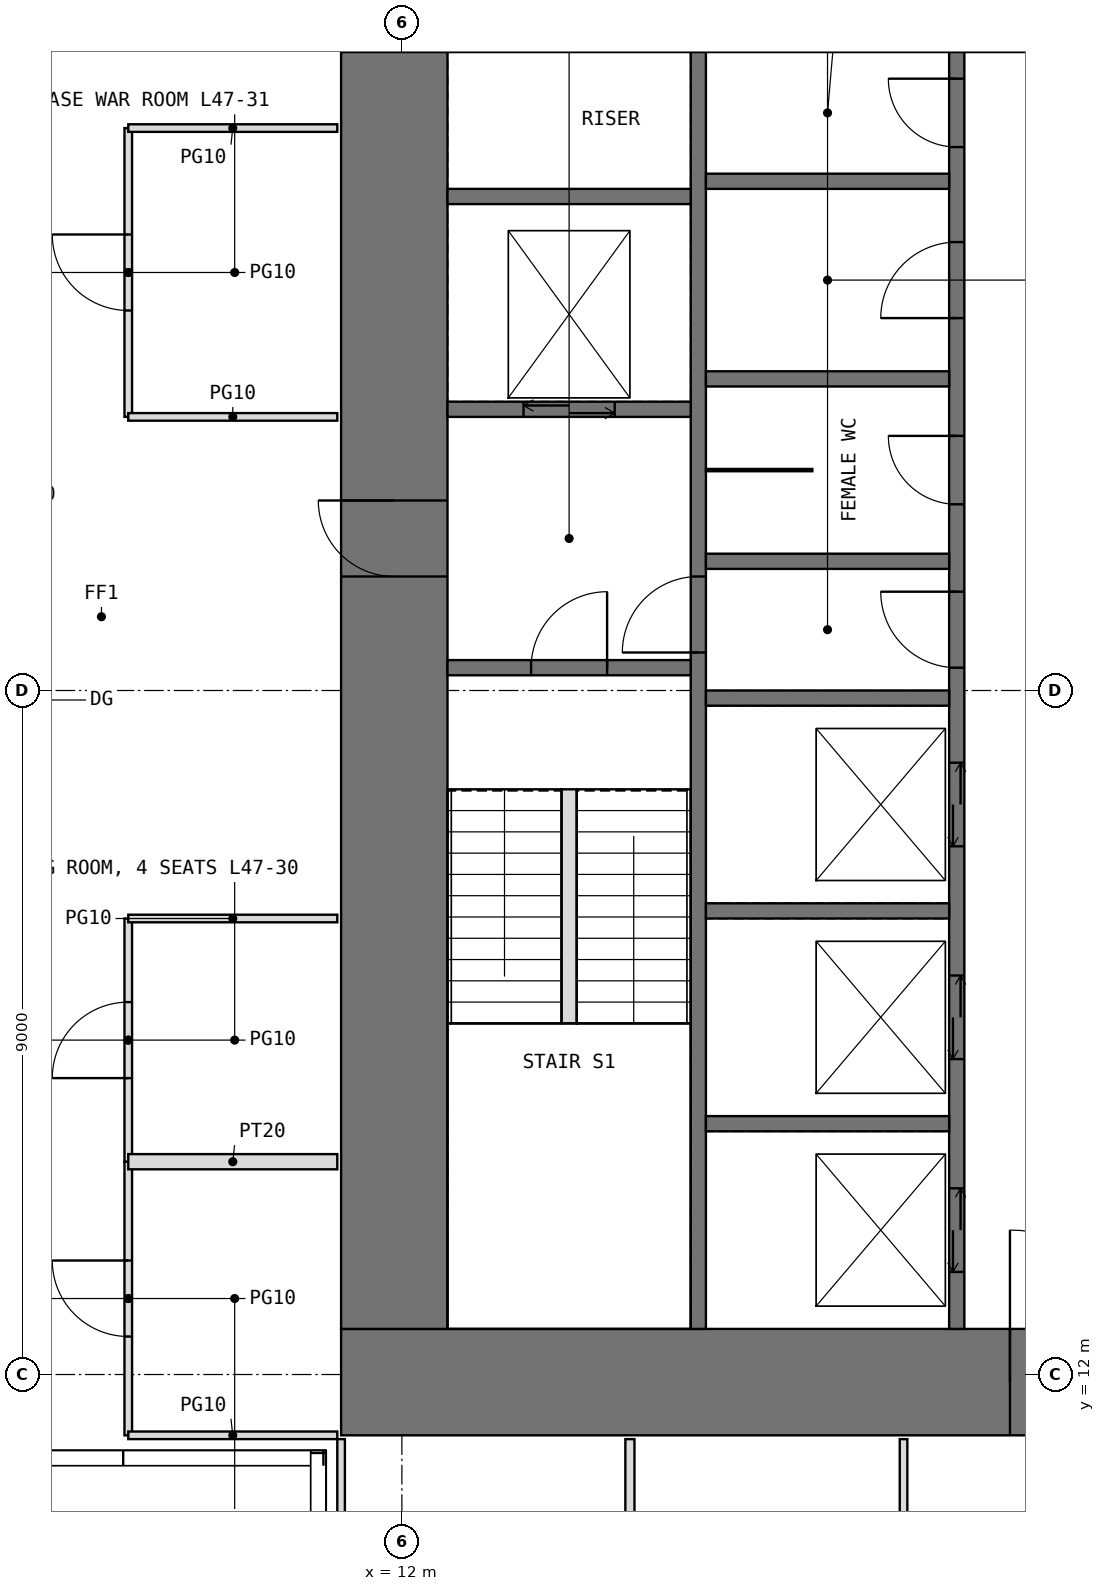
"""IFC4 building model, lengths in metres.
Left out: names, types, materials, properties, quantities, classifications, styles, units other than length and angle.
Written with IfcOpenShell. Run it as: python <this file> out.ifc"""

import sys

from ifc_helpers import new_model, si_unit, direction, frame, frame_2d, origin, place, context, subcontext, project, spatial, rectangle, extrude, element, fill, save


model = new_model("IFC4")
c1 = context("Model", 3, precision=1e-05, world=origin(), true_north=direction((0.0, 1.0)))
c2 = subcontext(c1, "Body", "Model", "MODEL_VIEW")
j1 = project(units=[si_unit("LENGTHUNIT", "METRE"), si_unit("PLANEANGLEUNIT", "RADIAN")], contexts=[c1])
p1 = place(None, origin())
s1 = spatial("IfcSite", under=j1, at=p1, CompositionType="ELEMENT")
p2 = place(p1, origin())
s2 = spatial("IfcBuilding", under=s1, at=p2, CompositionType="ELEMENT")
p3 = place(p2, frame((0.0, 0.0, 198.5)))
s3 = spatial("IfcBuildingStorey", under=s2, at=p3, CompositionType="ELEMENT", Elevation=198.5)
p4 = place(p3, frame((11.2, 11.9, -0.05), z_axis=(0.0, 0.0, 1.0), x_axis=(1.0, 0.0, 0.0)))
e1 = element("IfcWall", 1, at=p4, inside=s3, PredefinedType="SHEAR", context=c2, shape_type="SweptSolid", body=[
    extrude(rectangle(XDim=19.6, YDim=1.4, at=frame_2d((9.8, 0.0))), origin(), (0.0, 0.0, 1.0), 4.0),
])
p5 = place(p4, frame((8.8, 0.0, 0.05)))
e2 = element("IfcOpeningElement", 2, at=p5, cuts=e1, PredefinedType="OPENING", context=c2, shape_type="SweptSolid", body=[
    extrude(rectangle(XDim=2.0, YDim=2.2, at=frame_2d((1.0, 1.1))), frame((0.0, 0.71, 0.0), z_axis=(0.0, -1.0, 0.0), x_axis=(1.0, 0.0, 0.0)), (0.0, 0.0, 1.0), 1.42),
])
p6 = place(p3, frame((11.9, 12.6, -0.05), z_axis=(0.0, 0.0, 1.0), x_axis=(0.0, 1.0, 0.0)))
e3 = element("IfcWall", 3, at=p6, inside=s3, PredefinedType="SHEAR", context=c2, shape_type="SweptSolid", body=[
    extrude(rectangle(XDim=16.8, YDim=1.4, at=frame_2d((8.4, 0.0))), origin(), (0.0, 0.0, 1.0), 4.0),
])
p7 = place(p6, frame((9.9, 0.0, 0.05)))
e4 = element("IfcOpeningElement", 4, at=p7, cuts=e3, PredefinedType="OPENING", context=c2, shape_type="SweptSolid", body=[
    extrude(rectangle(XDim=1.0, YDim=2.2, at=frame_2d((0.5, 1.1))), frame((0.0, 0.71, 0.0), z_axis=(0.0, -1.0, 0.0), x_axis=(1.0, 0.0, 0.0)), (0.0, 0.0, 1.0), 1.42),
])
p8 = place(p3, frame((15.9, 12.6, -0.05), z_axis=(0.0, 0.0, 1.0), x_axis=(0.0, 1.0, 0.0)))
e5 = element("IfcWall", 5, at=p8, inside=s3, PredefinedType="SHEAR", context=c2, shape_type="SweptSolid", body=[
    extrude(rectangle(XDim=16.8, YDim=0.2, at=frame_2d((8.4, 0.0))), origin(), (0.0, 0.0, 1.0), 4.0),
])
p9 = place(p8, frame((8.9, 0.0, 0.05)))
e6 = element("IfcOpeningElement", 6, at=p9, cuts=e5, PredefinedType="OPENING", context=c2, shape_type="SweptSolid", body=[
    extrude(rectangle(XDim=1.0, YDim=2.2, at=frame_2d((0.5, 1.1))), frame((0.0, 0.11, 0.0), z_axis=(0.0, -1.0, 0.0), x_axis=(1.0, 0.0, 0.0)), (0.0, 0.0, 1.0), 0.22),
])
p10 = place(p3, frame((19.3, 12.6, -0.05), z_axis=(0.0, 0.0, 1.0), x_axis=(0.0, 1.0, 0.0)))
e7 = element("IfcWall", 7, at=p10, inside=s3, PredefinedType="SHEAR", context=c2, shape_type="SweptSolid", body=[
    extrude(rectangle(XDim=16.8, YDim=0.2, at=frame_2d((8.4, 0.0))), origin(), (0.0, 0.0, 1.0), 4.0),
])
p11 = place(p10, frame((8.7, 0.0, 0.05)))
e8 = element("IfcOpeningElement", 8, at=p11, cuts=e7, PredefinedType="OPENING", context=c2, shape_type="SweptSolid", body=[
    extrude(rectangle(XDim=1.0, YDim=2.2, at=frame_2d((0.5, 1.1))), frame((0.0, 0.11, 0.0), z_axis=(0.0, -1.0, 0.0), x_axis=(1.0, 0.0, 0.0)), (0.0, 0.0, 1.0), 0.22),
])
p12 = place(p10, frame((10.85, 0.0, 0.05)))
e9 = element("IfcOpeningElement", 9, at=p12, cuts=e7, PredefinedType="OPENING", context=c2, shape_type="SweptSolid", body=[
    extrude(rectangle(XDim=0.9, YDim=2.2, at=frame_2d((0.45, 1.1))), frame((0.0, 0.11, 0.0), z_axis=(0.0, -1.0, 0.0), x_axis=(1.0, 0.0, 0.0)), (0.0, 0.0, 1.0), 0.22),
])
p13 = place(p10, frame((13.3, 0.0, 0.05)))
e10 = element("IfcOpeningElement", 10, at=p13, cuts=e7, PredefinedType="OPENING", context=c2, shape_type="SweptSolid", body=[
    extrude(rectangle(XDim=1.0, YDim=2.2, at=frame_2d((0.5, 1.1))), frame((0.0, 0.11, 0.0), z_axis=(0.0, -1.0, 0.0), x_axis=(1.0, 0.0, 0.0)), (0.0, 0.0, 1.0), 0.22),
])
p14 = place(p10, frame((15.55, 0.0, 0.05)))
e11 = element("IfcOpeningElement", 11, at=p14, cuts=e7, PredefinedType="OPENING", context=c2, shape_type="SweptSolid", body=[
    extrude(rectangle(XDim=0.9, YDim=2.2, at=frame_2d((0.45, 1.1))), frame((0.0, 0.11, 0.0), z_axis=(0.0, -1.0, 0.0), x_axis=(1.0, 0.0, 0.0)), (0.0, 0.0, 1.0), 0.22),
])
p15 = place(p10, frame((0.75, 0.0, 0.05)))
e12 = element("IfcOpeningElement", 12, at=p15, cuts=e7, PredefinedType="OPENING", context=c2, shape_type="SweptSolid", body=[
    extrude(rectangle(XDim=1.1, YDim=2.2, at=frame_2d((0.55, 1.1))), frame((0.0, 0.11, 0.0), z_axis=(0.0, -1.0, 0.0), x_axis=(1.0, 0.0, 0.0)), (0.0, 0.0, 1.0), 0.22),
])
p16 = place(p10, frame((3.55, 0.0, 0.05)))
e13 = element("IfcOpeningElement", 13, at=p16, cuts=e7, PredefinedType="OPENING", context=c2, shape_type="SweptSolid", body=[
    extrude(rectangle(XDim=1.1, YDim=2.2, at=frame_2d((0.55, 1.1))), frame((0.0, 0.11, 0.0), z_axis=(0.0, -1.0, 0.0), x_axis=(1.0, 0.0, 0.0)), (0.0, 0.0, 1.0), 0.22),
])
p17 = place(p10, frame((6.35, 0.0, 0.05)))
e14 = element("IfcOpeningElement", 14, at=p17, cuts=e7, PredefinedType="OPENING", context=c2, shape_type="SweptSolid", body=[
    extrude(rectangle(XDim=1.1, YDim=2.2, at=frame_2d((0.55, 1.1))), frame((0.0, 0.11, 0.0), z_axis=(0.0, -1.0, 0.0), x_axis=(1.0, 0.0, 0.0)), (0.0, 0.0, 1.0), 0.22),
])
p18 = place(p3, frame((12.6, 21.3, -0.05), z_axis=(0.0, 0.0, 1.0), x_axis=(1.0, 0.0, 0.0)))
e15 = element("IfcWall", 15, at=p18, inside=s3, PredefinedType="SHEAR", context=c2, shape_type="SweptSolid", body=[
    extrude(rectangle(XDim=3.2, YDim=0.2, at=frame_2d((1.6, 0.0))), origin(), (0.0, 0.0, 1.0), 4.0),
])
p19 = place(p18, frame((1.1, 0.0, 0.05)))
e16 = element("IfcOpeningElement", 16, at=p19, cuts=e15, PredefinedType="OPENING", context=c2, shape_type="SweptSolid", body=[
    extrude(rectangle(XDim=1.0, YDim=2.2, at=frame_2d((0.5, 1.1))), frame((0.0, 0.11, 0.0), z_axis=(0.0, -1.0, 0.0), x_axis=(1.0, 0.0, 0.0)), (0.0, 0.0, 1.0), 0.22),
])
p20 = place(p3, frame((12.6, 24.7, -0.05), z_axis=(0.0, 0.0, 1.0), x_axis=(1.0, 0.0, 0.0)))
e17 = element("IfcWall", 17, at=p20, inside=s3, PredefinedType="SHEAR", context=c2, shape_type="SweptSolid", body=[
    extrude(rectangle(XDim=3.2, YDim=0.2, at=frame_2d((1.6, 0.0))), origin(), (0.0, 0.0, 1.0), 4.0),
])
p21 = place(p20, frame((1.0, 0.0, 0.05)))
e18 = element("IfcOpeningElement", 18, at=p21, cuts=e17, PredefinedType="OPENING", context=c2, shape_type="SweptSolid", body=[
    extrude(rectangle(XDim=1.2, YDim=2.2, at=frame_2d((0.6, 1.1))), frame((0.0, 0.11, 0.0), z_axis=(0.0, -1.0, 0.0), x_axis=(1.0, 0.0, 0.0)), (0.0, 0.0, 1.0), 0.22),
])
for number, where, z_axis, x_axis in (
    (19, (12.6, 27.5, -0.05), (0.0, 0.0, 1.0), (1.0, 0.0, 0.0)),
    (20, (16.0, 15.3, -0.05), (0.0, 0.0, 1.0), (1.0, 0.0, 0.0)),
    (21, (16.0, 18.1, -0.05), (0.0, 0.0, 1.0), (1.0, 0.0, 0.0)),
    (22, (16.0, 20.9, -0.05), (0.0, 0.0, 1.0), (1.0, 0.0, 0.0)),
    (23, (16.0, 22.7, -0.05), (0.0, 0.0, 1.0), (1.0, 0.0, 0.0)),
    (24, (16.0, 25.1, -0.05), (0.0, 0.0, 1.0), (1.0, 0.0, 0.0)),
    (25, (16.0, 27.7, -0.05), (0.0, 0.0, 1.0), (1.0, 0.0, 0.0)),
):
    element("IfcWall", number, at=place(p3, frame(where, z_axis=z_axis, x_axis=x_axis)), inside=s3, PredefinedType="SHEAR", context=c2, shape_type="SweptSolid", body=[
        extrude(rectangle(XDim=3.2, YDim=0.2, at=frame_2d((1.6, 0.0))), origin(), (0.0, 0.0, 1.0), 4.0),
    ])
p22 = place(p3, frame((16.0, 23.9, 0.0), z_axis=(0.0, 0.0, 1.0), x_axis=(1.0, 0.0, 0.0)))
e26 = element("IfcWall", 26, at=p22, inside=s3, PredefinedType="PARTITIONING", context=c2, shape_type="SweptSolid", body=[
    extrude(rectangle(XDim=1.4, YDim=0.03, at=frame_2d((0.7, 0.0))), origin(), (0.0, 0.0, 1.0), 3.75),
])
p23 = place(p3, frame((8.4, 11.2, 0.0), z_axis=(0.0, 0.0, 1.0), x_axis=(0.0, 1.0, 0.0)))
e27 = element("IfcWall", 27, at=p23, inside=s3, PredefinedType="PARTITIONING", context=c2, shape_type="SweptSolid", body=[
    extrude(rectangle(XDim=3.6, YDim=0.1, at=frame_2d((1.8, 0.0))), origin(), (0.0, 0.0, 1.0), 3.75),
])
p24 = place(p23, frame((1.3, 0.0, 0.0)))
e28 = element("IfcOpeningElement", 28, at=p24, cuts=e27, PredefinedType="OPENING", context=c2, shape_type="SweptSolid", body=[
    extrude(rectangle(XDim=1.0, YDim=2.4, at=frame_2d((0.5, 1.2))), frame((0.0, 0.06, 0.0), z_axis=(0.0, -1.0, 0.0), x_axis=(1.0, 0.0, 0.0)), (0.0, 0.0, 1.0), 0.12),
])
p25 = place(p3, frame((8.4, 11.2, 0.0), z_axis=(0.0, 0.0, 1.0), x_axis=(1.0, 0.0, 0.0)))
e29 = element("IfcWall", 29, at=p25, inside=s3, PredefinedType="PARTITIONING", context=c2, shape_type="SweptSolid", body=[
    extrude(rectangle(XDim=2.75, YDim=0.1, at=frame_2d((1.375, 0.0))), origin(), (0.0, 0.0, 1.0), 3.75),
])
p26 = place(p3, frame((8.4, 14.8, 0.0), z_axis=(0.0, 0.0, 1.0), x_axis=(0.0, 1.0, 0.0)))
e30 = element("IfcWall", 30, at=p26, inside=s3, PredefinedType="PARTITIONING", context=c2, shape_type="SweptSolid", body=[
    extrude(rectangle(XDim=3.2, YDim=0.1, at=frame_2d((1.6, 0.0))), origin(), (0.0, 0.0, 1.0), 3.75),
])
p27 = place(p26, frame((1.1, 0.0, 0.0)))
e31 = element("IfcOpeningElement", 31, at=p27, cuts=e30, PredefinedType="OPENING", context=c2, shape_type="SweptSolid", body=[
    extrude(rectangle(XDim=1.0, YDim=2.4, at=frame_2d((0.5, 1.2))), frame((0.0, 0.06, 0.0), z_axis=(0.0, -1.0, 0.0), x_axis=(1.0, 0.0, 0.0)), (0.0, 0.0, 1.0), 0.12),
])
p28 = place(p3, frame((8.4, 14.8, 0.0), z_axis=(0.0, 0.0, 1.0), x_axis=(1.0, 0.0, 0.0)))
e32 = element("IfcWall", 32, at=p28, inside=s3, PredefinedType="PARTITIONING", context=c2, shape_type="SweptSolid", body=[
    extrude(rectangle(XDim=2.75, YDim=0.2, at=frame_2d((1.375, 0.0))), origin(), (0.0, 0.0, 1.0), 3.75),
])
p29 = place(p3, frame((8.4, 18.0, 0.0), z_axis=(0.0, 0.0, 1.0), x_axis=(1.0, 0.0, 0.0)))
e33 = element("IfcWall", 33, at=p29, inside=s3, PredefinedType="PARTITIONING", context=c2, shape_type="SweptSolid", body=[
    extrude(rectangle(XDim=2.75, YDim=0.1, at=frame_2d((1.375, 0.0))), origin(), (0.0, 0.0, 1.0), 3.75),
])
p30 = place(p3, frame((8.4, 24.6, 0.0), z_axis=(0.0, 0.0, 1.0), x_axis=(0.0, 1.0, 0.0)))
e34 = element("IfcWall", 34, at=p30, inside=s3, PredefinedType="PARTITIONING", context=c2, shape_type="SweptSolid", body=[
    extrude(rectangle(XDim=3.8, YDim=0.1, at=frame_2d((1.9, 0.0))), origin(), (0.0, 0.0, 1.0), 3.75),
])
p31 = place(p30, frame((1.4, 0.0, 0.0)))
e35 = element("IfcOpeningElement", 35, at=p31, cuts=e34, PredefinedType="OPENING", context=c2, shape_type="SweptSolid", body=[
    extrude(rectangle(XDim=1.0, YDim=2.4, at=frame_2d((0.5, 1.2))), frame((0.0, 0.06, 0.0), z_axis=(0.0, -1.0, 0.0), x_axis=(1.0, 0.0, 0.0)), (0.0, 0.0, 1.0), 0.12),
])
for number, where, z_axis, x_axis in (
    (36, (8.4, 24.6, 0.0), (0.0, 0.0, 1.0), (1.0, 0.0, 0.0)),
    (37, (8.4, 28.4, 0.0), (0.0, 0.0, 1.0), (1.0, 0.0, 0.0)),
):
    element("IfcWall", number, at=place(p3, frame(where, z_axis=z_axis, x_axis=x_axis)), inside=s3, PredefinedType="PARTITIONING", context=c2, shape_type="SweptSolid", body=[
        extrude(rectangle(XDim=2.75, YDim=0.1, at=frame_2d((1.375, 0.0))), origin(), (0.0, 0.0, 1.0), 3.75),
    ])
p32 = place(p3, frame((11.2, 6.8, 0.0), z_axis=(0.0, 0.0, 1.0), x_axis=(0.0, 1.0, 0.0)))
e38 = element("IfcWall", 38, at=p32, inside=s3, PredefinedType="PARTITIONING", context=c2, shape_type="SweptSolid", body=[
    extrude(rectangle(XDim=4.35, YDim=0.1, at=frame_2d((2.175, 0.0))), origin(), (0.0, 0.0, 1.0), 3.75),
])
p33 = place(p3, frame((15.0, 6.8, 0.0), z_axis=(0.0, 0.0, 1.0), x_axis=(0.0, 1.0, 0.0)))
e39 = element("IfcWall", 39, at=p33, inside=s3, PredefinedType="PARTITIONING", context=c2, shape_type="SweptSolid", body=[
    extrude(rectangle(XDim=4.35, YDim=0.12, at=frame_2d((2.175, 0.0))), origin(), (0.0, 0.0, 1.0), 3.75),
])
p34 = place(p3, frame((18.6, 6.8, 0.0), z_axis=(0.0, 0.0, 1.0), x_axis=(0.0, 1.0, 0.0)))
e40 = element("IfcWall", 40, at=p34, inside=s3, PredefinedType="PARTITIONING", context=c2, shape_type="SweptSolid", body=[
    extrude(rectangle(XDim=4.35, YDim=0.1, at=frame_2d((2.175, 0.0))), origin(), (0.0, 0.0, 1.0), 3.75),
])
p35 = place(p3, frame((14.2, 16.62, 0.0), z_axis=(0.0, 0.0, 1.0), x_axis=(0.0, 1.0, 0.0)))
e41 = element("IfcWall", 41, at=p35, inside=s3, PredefinedType="PARTITIONING", context=c2, shape_type="SweptSolid", body=[
    extrude(rectangle(XDim=3.08, YDim=0.2, at=frame_2d((1.54, 0.0))), origin(), (0.0, 0.0, 1.0), 4.0),
])
p36 = place(p5, origin())
e42 = element("IfcDoor", 42, at=p36, inside=s3, OperationType="DOUBLE_DOOR_SINGLE_SWING", PredefinedType="DOOR", context=c2, shape_type="SweptSolid", body=[
    extrude(rectangle(XDim=2.0, YDim=2.2, at=frame_2d((1.0, 1.1))), frame((0.0, 0.025, 0.0), z_axis=(0.0, -1.0, 0.0), x_axis=(1.0, 0.0, 0.0)), (0.0, 0.0, 1.0), 0.05),
])
fill(e2, e42)
p37 = place(p7, origin())
e43 = element("IfcDoor", 43, at=p37, inside=s3, OperationType="SINGLE_SWING_RIGHT", PredefinedType="DOOR", context=c2, shape_type="SweptSolid", body=[
    extrude(rectangle(XDim=1.0, YDim=2.2, at=frame_2d((0.5, 1.1))), frame((0.0, 0.025, 0.0), z_axis=(0.0, -1.0, 0.0), x_axis=(1.0, 0.0, 0.0)), (0.0, 0.0, 1.0), 0.05),
])
fill(e4, e43)
p38 = place(p19, origin())
e44 = element("IfcDoor", 44, at=p38, inside=s3, OperationType="SINGLE_SWING_RIGHT", PredefinedType="DOOR", context=c2, shape_type="SweptSolid", body=[
    extrude(rectangle(XDim=1.0, YDim=2.2, at=frame_2d((0.5, 1.1))), frame((0.0, 0.025, 0.0), z_axis=(0.0, -1.0, 0.0), x_axis=(1.0, 0.0, 0.0)), (0.0, 0.0, 1.0), 0.05),
])
fill(e16, e44)
p39 = place(p9, origin())
e45 = element("IfcDoor", 45, at=p39, inside=s3, OperationType="SINGLE_SWING_LEFT", PredefinedType="DOOR", context=c2, shape_type="SweptSolid", body=[
    extrude(rectangle(XDim=1.0, YDim=2.2, at=frame_2d((0.5, 1.1))), frame((0.0, 0.025, 0.0), z_axis=(0.0, -1.0, 0.0), x_axis=(1.0, 0.0, 0.0)), (0.0, 0.0, 1.0), 0.05),
])
fill(e6, e45)
p40 = place(p11, origin())
e46 = element("IfcDoor", 46, at=p40, inside=s3, OperationType="SINGLE_SWING_RIGHT", PredefinedType="DOOR", context=c2, shape_type="SweptSolid", body=[
    extrude(rectangle(XDim=1.0, YDim=2.2, at=frame_2d((0.5, 1.1))), frame((0.0, 0.025, 0.0), z_axis=(0.0, -1.0, 0.0), x_axis=(1.0, 0.0, 0.0)), (0.0, 0.0, 1.0), 0.05),
])
fill(e8, e46)
p41 = place(p12, origin())
e47 = element("IfcDoor", 47, at=p41, inside=s3, OperationType="SINGLE_SWING_RIGHT", PredefinedType="DOOR", context=c2, shape_type="SweptSolid", body=[
    extrude(rectangle(XDim=0.9, YDim=2.2, at=frame_2d((0.45, 1.1))), frame((0.0, 0.025, 0.0), z_axis=(0.0, -1.0, 0.0), x_axis=(1.0, 0.0, 0.0)), (0.0, 0.0, 1.0), 0.05),
])
fill(e9, e47)
p42 = place(p13, origin())
e48 = element("IfcDoor", 48, at=p42, inside=s3, OperationType="SINGLE_SWING_LEFT", PredefinedType="DOOR", context=c2, shape_type="SweptSolid", body=[
    extrude(rectangle(XDim=1.0, YDim=2.2, at=frame_2d((0.5, 1.1))), frame((0.0, 0.025, 0.0), z_axis=(0.0, -1.0, 0.0), x_axis=(1.0, 0.0, 0.0)), (0.0, 0.0, 1.0), 0.05),
])
fill(e10, e48)
p43 = place(p14, origin())
e49 = element("IfcDoor", 49, at=p43, inside=s3, OperationType="SINGLE_SWING_RIGHT", PredefinedType="DOOR", context=c2, shape_type="SweptSolid", body=[
    extrude(rectangle(XDim=0.9, YDim=2.2, at=frame_2d((0.45, 1.1))), frame((0.0, 0.025, 0.0), z_axis=(0.0, -1.0, 0.0), x_axis=(1.0, 0.0, 0.0)), (0.0, 0.0, 1.0), 0.05),
])
fill(e11, e49)
p44 = place(p24, origin())
e50 = element("IfcDoor", 50, at=p44, inside=s3, OperationType="SINGLE_SWING_RIGHT", PredefinedType="DOOR", context=c2, shape_type="SweptSolid", body=[
    extrude(rectangle(XDim=1.0, YDim=2.4, at=frame_2d((0.5, 1.2))), frame((0.0, 0.025, 0.0), z_axis=(0.0, -1.0, 0.0), x_axis=(1.0, 0.0, 0.0)), (0.0, 0.0, 1.0), 0.05),
])
fill(e28, e50)
p45 = place(p27, origin())
e51 = element("IfcDoor", 51, at=p45, inside=s3, OperationType="SINGLE_SWING_LEFT", PredefinedType="DOOR", context=c2, shape_type="SweptSolid", body=[
    extrude(rectangle(XDim=1.0, YDim=2.4, at=frame_2d((0.5, 1.2))), frame((0.0, 0.025, 0.0), z_axis=(0.0, -1.0, 0.0), x_axis=(1.0, 0.0, 0.0)), (0.0, 0.0, 1.0), 0.05),
])
fill(e31, e51)
p46 = place(p31, origin())
e52 = element("IfcDoor", 52, at=p46, inside=s3, OperationType="SINGLE_SWING_RIGHT", PredefinedType="DOOR", context=c2, shape_type="SweptSolid", body=[
    extrude(rectangle(XDim=1.0, YDim=2.4, at=frame_2d((0.5, 1.2))), frame((0.0, 0.025, 0.0), z_axis=(0.0, -1.0, 0.0), x_axis=(1.0, 0.0, 0.0)), (0.0, 0.0, 1.0), 0.05),
])
fill(e35, e52)
p47 = place(p15, origin())
e53 = element("IfcDoor", 53, at=p47, inside=s3, OperationType="DOUBLE_DOOR_SLIDING", PredefinedType="DOOR", context=c2, shape_type="SweptSolid", body=[
    extrude(rectangle(XDim=1.1, YDim=2.2, at=frame_2d((0.55, 1.1))), frame((0.0, 0.025, 0.0), z_axis=(0.0, -1.0, 0.0), x_axis=(1.0, 0.0, 0.0)), (0.0, 0.0, 1.0), 0.05),
])
fill(e12, e53)
p48 = place(p16, origin())
e54 = element("IfcDoor", 54, at=p48, inside=s3, OperationType="DOUBLE_DOOR_SLIDING", PredefinedType="DOOR", context=c2, shape_type="SweptSolid", body=[
    extrude(rectangle(XDim=1.1, YDim=2.2, at=frame_2d((0.55, 1.1))), frame((0.0, 0.025, 0.0), z_axis=(0.0, -1.0, 0.0), x_axis=(1.0, 0.0, 0.0)), (0.0, 0.0, 1.0), 0.05),
])
fill(e13, e54)
p49 = place(p17, origin())
e55 = element("IfcDoor", 55, at=p49, inside=s3, OperationType="DOUBLE_DOOR_SLIDING", PredefinedType="DOOR", context=c2, shape_type="SweptSolid", body=[
    extrude(rectangle(XDim=1.1, YDim=2.2, at=frame_2d((0.55, 1.1))), frame((0.0, 0.025, 0.0), z_axis=(0.0, -1.0, 0.0), x_axis=(1.0, 0.0, 0.0)), (0.0, 0.0, 1.0), 0.05),
])
fill(e14, e55)
p50 = place(p21, origin())
e56 = element("IfcDoor", 56, at=p50, inside=s3, OperationType="DOUBLE_DOOR_SLIDING", PredefinedType="DOOR", context=c2, shape_type="SweptSolid", body=[
    extrude(rectangle(XDim=1.2, YDim=2.2, at=frame_2d((0.6, 1.1))), frame((0.0, 0.025, 0.0), z_axis=(0.0, -1.0, 0.0), x_axis=(1.0, 0.0, 0.0)), (0.0, 0.0, 1.0), 0.05),
])
fill(e18, e56)
save(model, sys.argv[1])
